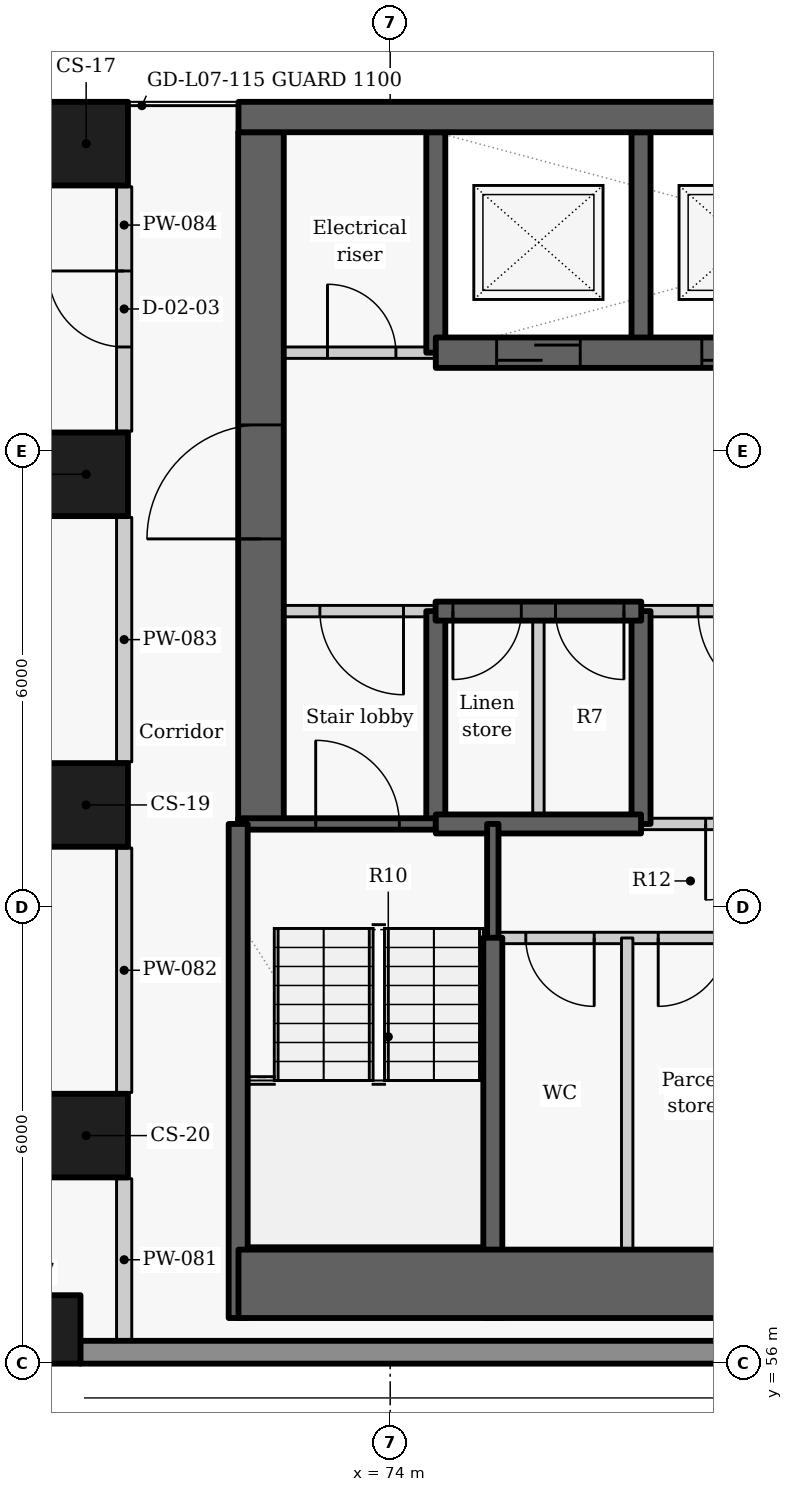
"""IFC4 building model, lengths in metres.
Left out: names, types, materials, properties, quantities, classifications, styles, units other than length and angle.
Written with IfcOpenShell. Run it as: python <this file> out.ifc"""

import sys

from ifc_helpers import new_model, si_unit, direction, frame, frame_2d, origin, origin_2d, place, context, subcontext, project, spatial, rectangle, extrude, element, fill, save


model = new_model("IFC4")
c1 = context("Model", 3, precision=1e-05, world=origin(), true_north=direction((0.0, 1.0)))
c2 = subcontext(c1, "Body", "Model", "MODEL_VIEW")
j1 = project(units=[si_unit("LENGTHUNIT", "METRE"), si_unit("PLANEANGLEUNIT", "RADIAN")], contexts=[c1])
p1 = place(None, origin())
s1 = spatial("IfcSite", under=j1, at=p1, CompositionType="ELEMENT")
p2 = place(p1, origin())
s2 = spatial("IfcBuilding", under=s1, at=p2, CompositionType="ELEMENT")
p3 = place(p2, frame((0.0, 0.0, 31.5)))
s3 = spatial("IfcBuildingStorey", under=s2, at=p3, CompositionType="ELEMENT", Elevation=31.5)
p4 = place(p3, frame((69.175, 56.45, 0.0), z_axis=(0.0, 0.0, 1.0), x_axis=(1.0, 0.0, 0.0)))
e1 = element("IfcColumn", 1, at=p4, inside=s3, PredefinedType="COLUMN", context=c2, shape_type="SweptSolid", body=[
    extrude(rectangle(XDim=1.5, YDim=0.9, at=origin_2d()), origin(), (0.0, 0.0, 1.0), 3.3),
])
for number, where, z_axis, x_axis in (
    (2, (70.0, 72.05, 0.0), (0.0, 0.0, 1.0), (0.0, -1.0, 0.0)),
    (3, (70.0, 67.7, 0.0), (0.0, 0.0, 1.0), (0.0, -1.0, 0.0)),
    (4, (70.0, 63.35, 0.0), (0.0, 0.0, 1.0), (0.0, -1.0, 0.0)),
    (5, (70.0, 59.0, 0.0), (0.0, 0.0, 1.0), (0.0, -1.0, 0.0)),
):
    element("IfcColumn", number, at=place(p3, frame(where, z_axis=z_axis, x_axis=x_axis)), inside=s3, PredefinedType="COLUMN", context=c2, shape_type="SweptSolid", body=[
        extrude(rectangle(XDim=1.1, YDim=1.1, at=origin_2d()), origin(), (0.0, 0.0, 1.0), 3.3),
    ])
p5 = place(p3, frame((69.921, 56.15, 0.0), z_axis=(0.0, 0.0, 1.0), x_axis=(1.0, 0.0, 0.0)))
e6 = element("IfcWall", 6, at=p5, inside=s3, PredefinedType="SOLIDWALL", context=c2, shape_type="SweptSolid", body=[
    extrude(rectangle(XDim=19.84, YDim=0.3, at=frame_2d((9.92, 0.0))), origin(), (0.0, 0.0, 1.0), 2.425),
])
p6 = place(p3, frame((74.6, 63.1, -0.275), z_axis=(0.0, 0.0, 1.0), x_axis=(0.0, 1.0, 0.0)))
e7 = element("IfcWall", 7, at=p6, inside=s3, PredefinedType="SHEAR", context=c2, shape_type="SweptSolid", body=[
    extrude(rectangle(XDim=2.8, YDim=0.25, at=frame_2d((1.4, 0.0))), origin(), (0.0, 0.0, 1.0), 3.3),
])
p7 = place(p3, frame((74.6, 69.3, -0.275), z_axis=(0.0, 0.0, 1.0), x_axis=(0.0, 1.0, 0.0)))
e8 = element("IfcWall", 8, at=p7, inside=s3, PredefinedType="SHEAR", context=c2, shape_type="SweptSolid", body=[
    extrude(rectangle(XDim=2.9, YDim=0.25, at=frame_2d((1.45, 0.0))), origin(), (0.0, 0.0, 1.0), 3.3),
])
p8 = place(p3, frame((72.0, 69.3, 0.0), z_axis=(0.0, 0.0, 1.0), x_axis=(1.0, 0.0, 0.0)))
e9 = element("IfcWall", 9, at=p8, inside=s3, PredefinedType="PARTITIONING", context=c2, shape_type="SweptSolid", body=[
    extrude(rectangle(XDim=2.6, YDim=0.15, at=frame_2d((1.3, 0.0))), origin(), (0.0, 0.0, 1.0), 3.025),
])
p9 = place(p8, frame((1.175, 0.0, 0.0)))
e10 = element("IfcOpeningElement", 10, at=p9, cuts=e9, PredefinedType="OPENING", context=c2, shape_type="SweptSolid", body=[
    extrude(rectangle(XDim=0.9, YDim=2.1, at=frame_2d((0.45, 1.05))), frame((0.0, 0.085, 0.0), z_axis=(0.0, -1.0, 0.0), x_axis=(1.0, 0.0, 0.0)), (0.0, 0.0, 1.0), 0.17),
])
p10 = place(p3, frame((72.3, 63.1, -0.275), z_axis=(0.0, 0.0, 1.0), x_axis=(0.0, 1.0, 0.0)))
e11 = element("IfcWall", 11, at=p10, inside=s3, PredefinedType="SHEAR", context=c2, shape_type="SweptSolid", body=[
    extrude(rectangle(XDim=9.1, YDim=0.6, at=frame_2d((4.55, 0.0))), origin(), (0.0, 0.0, 1.0), 3.3),
])
p11 = place(p10, frame((3.75, 0.0, 0.275)))
e12 = element("IfcOpeningElement", 12, at=p11, cuts=e11, PredefinedType="OPENING", context=c2, shape_type="SweptSolid", body=[
    extrude(rectangle(XDim=1.5, YDim=2.1, at=frame_2d((0.75, 1.05))), frame((0.0, 0.31, 0.0), z_axis=(0.0, -1.0, 0.0), x_axis=(1.0, 0.0, 0.0)), (0.0, 0.0, 1.0), 0.62),
])
p12 = place(p3, frame((77.3, 63.1, -0.275), z_axis=(0.0, 0.0, 1.0), x_axis=(0.0, 1.0, 0.0)))
e13 = element("IfcWall", 13, at=p12, inside=s3, PredefinedType="SHEAR", context=c2, shape_type="SweptSolid", body=[
    extrude(rectangle(XDim=2.8, YDim=0.25, at=frame_2d((1.4, 0.0))), origin(), (0.0, 0.0, 1.0), 3.3),
])
p13 = place(p3, frame((77.3, 69.3, -0.275), z_axis=(0.0, 0.0, 1.0), x_axis=(0.0, 1.0, 0.0)))
e14 = element("IfcWall", 14, at=p13, inside=s3, PredefinedType="SHEAR", context=c2, shape_type="SweptSolid", body=[
    extrude(rectangle(XDim=2.9, YDim=0.25, at=frame_2d((1.45, 0.0))), origin(), (0.0, 0.0, 1.0), 3.3),
])
p14 = place(p3, frame((74.6, 69.3, -0.275), z_axis=(0.0, 0.0, 1.0), x_axis=(1.0, 0.0, 0.0)))
e15 = element("IfcWall", 15, at=p14, inside=s3, PredefinedType="SHEAR", context=c2, shape_type="SweptSolid", body=[
    extrude(rectangle(XDim=10.8, YDim=0.4, at=frame_2d((5.4, 0.0))), origin(), (0.0, 0.0, 1.0), 3.3),
])
p15 = place(p14, frame((0.8, 0.0, 0.275)))
e16 = element("IfcOpeningElement", 16, at=p15, cuts=e15, PredefinedType="OPENING", context=c2, shape_type="SweptSolid", body=[
    extrude(rectangle(XDim=1.1, YDim=2.1, at=frame_2d((0.55, 1.05))), frame((0.0, 0.21, 0.0), z_axis=(0.0, -1.0, 0.0), x_axis=(1.0, 0.0, 0.0)), (0.0, 0.0, 1.0), 0.42),
])
p16 = place(p14, frame((3.5, 0.0, 0.275)))
e17 = element("IfcOpeningElement", 17, at=p16, cuts=e15, PredefinedType="OPENING", context=c2, shape_type="SweptSolid", body=[
    extrude(rectangle(XDim=1.1, YDim=2.1, at=frame_2d((0.55, 1.05))), frame((0.0, 0.21, 0.0), z_axis=(0.0, -1.0, 0.0), x_axis=(1.0, 0.0, 0.0)), (0.0, 0.0, 1.0), 0.42),
])
p17 = place(p14, frame((6.2, 0.0, 0.275)))
e18 = element("IfcOpeningElement", 18, at=p17, cuts=e15, PredefinedType="OPENING", context=c2, shape_type="SweptSolid", body=[
    extrude(rectangle(XDim=1.1, YDim=2.1, at=frame_2d((0.55, 1.05))), frame((0.0, 0.21, 0.0), z_axis=(0.0, -1.0, 0.0), x_axis=(1.0, 0.0, 0.0)), (0.0, 0.0, 1.0), 0.42),
])
p18 = place(p3, frame((74.603, 65.9, 0.0), z_axis=(0.0, 0.0, 1.0), x_axis=(-1.0, 0.0, 0.0)))
e19 = element("IfcWall", 19, at=p18, inside=s3, PredefinedType="PARTITIONING", context=c2, shape_type="SweptSolid", body=[
    extrude(rectangle(XDim=2.603, YDim=0.15, at=frame_2d((1.302, 0.0))), origin(), (0.0, 0.0, 1.0), 3.025),
])
p19 = place(p18, frame((0.428, 0.0, 0.0)))
e20 = element("IfcOpeningElement", 20, at=p19, cuts=e19, PredefinedType="OPENING", context=c2, shape_type="SweptSolid", body=[
    extrude(rectangle(XDim=1.1, YDim=2.1, at=frame_2d((0.55, 1.05))), frame((0.0, 0.085, 0.0), z_axis=(0.0, -1.0, 0.0), x_axis=(1.0, 0.0, 0.0)), (0.0, 0.0, 1.0), 0.17),
])
p20 = place(p3, frame((80.003, 65.9, 0.0), z_axis=(0.0, 0.0, 1.0), x_axis=(-1.0, 0.0, 0.0)))
e21 = element("IfcWall", 21, at=p20, inside=s3, PredefinedType="PARTITIONING", context=c2, shape_type="SweptSolid", body=[
    extrude(rectangle(XDim=2.706, YDim=0.15, at=frame_2d((1.353, 0.0))), origin(), (0.0, 0.0, 1.0), 3.025),
])
p21 = place(p20, frame((0.753, 0.0, 0.0)))
e22 = element("IfcOpeningElement", 22, at=p21, cuts=e21, PredefinedType="OPENING", context=c2, shape_type="SweptSolid", body=[
    extrude(rectangle(XDim=1.2, YDim=2.1, at=frame_2d((0.6, 1.05))), frame((0.0, 0.085, 0.0), z_axis=(0.0, -1.0, 0.0), x_axis=(1.0, 0.0, 0.0)), (0.0, 0.0, 1.0), 0.17),
])
p22 = place(p3, frame((77.303, 65.9, -0.275), z_axis=(0.0, 0.0, 1.0), x_axis=(-1.0, 0.0, 0.0)))
e23 = element("IfcWall", 23, at=p22, inside=s3, PredefinedType="SHEAR", context=c2, shape_type="SweptSolid", body=[
    extrude(rectangle(XDim=2.706, YDim=0.25, at=frame_2d((1.353, 0.0))), origin(), (0.0, 0.0, 1.0), 3.3),
])
p23 = place(p22, frame((1.578, 0.0, 0.275)))
e24 = element("IfcOpeningElement", 24, at=p23, cuts=e23, PredefinedType="OPENING", context=c2, shape_type="SweptSolid", body=[
    extrude(rectangle(XDim=0.9, YDim=2.1, at=frame_2d((0.45, 1.05))), frame((0.0, 0.135, 0.0), z_axis=(0.0, -1.0, 0.0), x_axis=(1.0, 0.0, 0.0)), (0.0, 0.0, 1.0), 0.27),
])
p24 = place(p22, frame((0.228, 0.0, 0.275)))
e25 = element("IfcOpeningElement", 25, at=p24, cuts=e23, PredefinedType="OPENING", context=c2, shape_type="SweptSolid", body=[
    extrude(rectangle(XDim=0.9, YDim=2.1, at=frame_2d((0.45, 1.05))), frame((0.0, 0.135, 0.0), z_axis=(0.0, -1.0, 0.0), x_axis=(1.0, 0.0, 0.0)), (0.0, 0.0, 1.0), 0.27),
])
p25 = place(p3, frame((72.0, 63.1, -0.275), z_axis=(0.0, 0.0, 1.0), x_axis=(1.0, 0.0, 0.0)))
e26 = element("IfcWall", 26, at=p25, inside=s3, PredefinedType="SHEAR", context=c2, shape_type="SweptSolid", body=[
    extrude(rectangle(XDim=2.6, YDim=0.15, at=frame_2d((1.3, 0.0))), origin(), (0.0, 0.0, 1.0), 3.3),
])
p26 = place(p25, frame((1.02, 0.0, 0.275)))
e27 = element("IfcOpeningElement", 27, at=p26, cuts=e26, PredefinedType="OPENING", context=c2, shape_type="SweptSolid", body=[
    extrude(rectangle(XDim=1.1, YDim=2.1, at=frame_2d((0.55, 1.05))), frame((0.0, 0.085, 0.0), z_axis=(0.0, -1.0, 0.0), x_axis=(1.0, 0.0, 0.0)), (0.0, 0.0, 1.0), 0.17),
])
p27 = place(p3, frame((75.95, 63.1, 0.0), z_axis=(0.0, 0.0, 1.0), x_axis=(0.0, 1.0, 0.0)))
e28 = element("IfcWall", 28, at=p27, inside=s3, PredefinedType="PARTITIONING", context=c2, shape_type="SweptSolid", body=[
    extrude(rectangle(XDim=2.8, YDim=0.15, at=frame_2d((1.4, 0.0))), origin(), (0.0, 0.0, 1.0), 3.025),
])
p28 = place(p3, frame((74.6, 63.1, -0.275), z_axis=(0.0, 0.0, 1.0), x_axis=(1.0, 0.0, 0.0)))
e29 = element("IfcWall", 29, at=p28, inside=s3, PredefinedType="SHEAR", context=c2, shape_type="SweptSolid", body=[
    extrude(rectangle(XDim=2.7, YDim=0.25, at=frame_2d((1.35, 0.0))), origin(), (0.0, 0.0, 1.0), 3.3),
])
p29 = place(p3, frame((80.0, 63.1, 0.0), z_axis=(0.0, 0.0, 1.0), x_axis=(-1.0, 0.0, 0.0)))
e30 = element("IfcWall", 30, at=p29, inside=s3, PredefinedType="PARTITIONING", context=c2, shape_type="SweptSolid", body=[
    extrude(rectangle(XDim=2.7, YDim=0.15, at=frame_2d((1.35, 0.0))), origin(), (0.0, 0.0, 1.0), 3.025),
])
p30 = place(p29, frame((0.85, 0.0, 0.0)))
e31 = element("IfcOpeningElement", 31, at=p30, cuts=e30, PredefinedType="OPENING", context=c2, shape_type="SweptSolid", body=[
    extrude(rectangle(XDim=1.0, YDim=2.1, at=frame_2d((0.5, 1.05))), frame((0.0, 0.085, 0.0), z_axis=(0.0, -1.0, 0.0), x_axis=(1.0, 0.0, 0.0)), (0.0, 0.0, 1.0), 0.17),
])
p31 = place(p3, frame((75.35, 61.597, -0.275), z_axis=(0.0, 0.0, 1.0), x_axis=(0.0, 1.0, 0.0)))
e32 = element("IfcWall", 32, at=p31, inside=s3, PredefinedType="SHEAR", context=c2, shape_type="SweptSolid", body=[
    extrude(rectangle(XDim=1.503, YDim=0.15, at=frame_2d((0.751, 0.0))), origin(), (0.0, 0.0, 1.0), 3.3),
])
p32 = place(p3, frame((75.35, 56.6, -0.275), z_axis=(0.0, 0.0, 1.0), x_axis=(0.0, 1.0, 0.0)))
e33 = element("IfcWall", 33, at=p32, inside=s3, PredefinedType="SHEAR", context=c2, shape_type="SweptSolid", body=[
    extrude(rectangle(XDim=5.003, YDim=0.25, at=frame_2d((2.501, 0.0))), origin(), (0.0, 0.0, 1.0), 3.3),
])
p33 = place(p3, frame((72.0, 56.6, -0.275), z_axis=(0.0, 0.0, 1.0), x_axis=(0.0, 1.0, 0.0)))
e34 = element("IfcWall", 34, at=p33, inside=s3, PredefinedType="SHEAR", context=c2, shape_type="SweptSolid", body=[
    extrude(rectangle(XDim=6.5, YDim=0.25, at=frame_2d((3.25, 0.0))), origin(), (0.0, 0.0, 1.0), 3.3),
])
p34 = place(p3, frame((80.55, 61.6, 0.0), z_axis=(0.0, 0.0, 1.0), x_axis=(-1.0, 0.0, 0.0)))
e35 = element("IfcWall", 35, at=p34, inside=s3, PredefinedType="PARTITIONING", context=c2, shape_type="SweptSolid", body=[
    extrude(rectangle(XDim=5.2, YDim=0.15, at=frame_2d((2.6, 0.0))), origin(), (0.0, 0.0, 1.0), 3.025),
])
p35 = place(p34, frame((3.866, 0.0, 0.0)))
e36 = element("IfcOpeningElement", 36, at=p35, cuts=e35, PredefinedType="OPENING", context=c2, shape_type="SweptSolid", body=[
    extrude(rectangle(XDim=0.9, YDim=2.1, at=frame_2d((0.45, 1.05))), frame((0.0, 0.085, 0.0), z_axis=(0.0, -1.0, 0.0), x_axis=(1.0, 0.0, 0.0)), (0.0, 0.0, 1.0), 0.17),
])
p36 = place(p34, frame((2.124, 0.0, 0.0)))
e37 = element("IfcOpeningElement", 37, at=p36, cuts=e35, PredefinedType="OPENING", context=c2, shape_type="SweptSolid", body=[
    extrude(rectangle(XDim=0.9, YDim=2.1, at=frame_2d((0.45, 1.05))), frame((0.0, 0.085, 0.0), z_axis=(0.0, -1.0, 0.0), x_axis=(1.0, 0.0, 0.0)), (0.0, 0.0, 1.0), 0.17),
])
p37 = place(p34, frame((0.408, 0.0, 0.0)))
e38 = element("IfcOpeningElement", 38, at=p37, cuts=e35, PredefinedType="OPENING", context=c2, shape_type="SweptSolid", body=[
    extrude(rectangle(XDim=0.9, YDim=2.1, at=frame_2d((0.45, 1.05))), frame((0.0, 0.085, 0.0), z_axis=(0.0, -1.0, 0.0), x_axis=(1.0, 0.0, 0.0)), (0.0, 0.0, 1.0), 0.17),
])
p38 = place(p3, frame((77.118, 56.6, 0.0), z_axis=(0.0, 0.0, 1.0), x_axis=(0.0, 1.0, 0.0)))
e39 = element("IfcWall", 39, at=p38, inside=s3, PredefinedType="PARTITIONING", context=c2, shape_type="SweptSolid", body=[
    extrude(rectangle(XDim=5.0, YDim=0.15, at=frame_2d((2.5, 0.0))), origin(), (0.0, 0.0, 1.0), 3.025),
])
p39 = place(p3, frame((70.5, 56.3, 0.0), z_axis=(0.0, 0.0, 1.0), x_axis=(0.0, 1.0, 0.0)))
e40 = element("IfcWall", 40, at=p39, inside=s3, PredefinedType="PARTITIONING", context=c2, shape_type="SweptSolid", body=[
    extrude(rectangle(XDim=2.133, YDim=0.2, at=frame_2d((1.066, 0.0))), origin(), (0.0, 0.0, 1.0), 3.025),
])
for number, where, z_axis, x_axis in (
    (41, (70.5, 59.567, 0.0), (0.0, 0.0, 1.0), (0.0, 1.0, 0.0)),
    (42, (70.5, 63.917, 0.0), (0.0, 0.0, 1.0), (0.0, 1.0, 0.0)),
):
    element("IfcWall", number, at=place(p3, frame(where, z_axis=z_axis, x_axis=x_axis)), inside=s3, PredefinedType="PARTITIONING", context=c2, shape_type="SweptSolid", body=[
        extrude(rectangle(XDim=3.216, YDim=0.2, at=frame_2d((1.608, 0.0))), origin(), (0.0, 0.0, 1.0), 3.025),
    ])
p40 = place(p3, frame((70.5, 68.267, 0.0), z_axis=(0.0, 0.0, 1.0), x_axis=(0.0, 1.0, 0.0)))
e43 = element("IfcWall", 43, at=p40, inside=s3, PredefinedType="PARTITIONING", context=c2, shape_type="SweptSolid", body=[
    extrude(rectangle(XDim=3.216, YDim=0.2, at=frame_2d((1.608, 0.0))), origin(), (0.0, 0.0, 1.0), 3.025),
])
p41 = place(p40, frame((1.108, 0.0, 0.0)))
e44 = element("IfcOpeningElement", 44, at=p41, cuts=e43, PredefinedType="OPENING", context=c2, shape_type="SweptSolid", body=[
    extrude(rectangle(XDim=1.0, YDim=2.1, at=frame_2d((0.5, 1.05))), frame((0.0, 0.11, 0.0), z_axis=(0.0, -1.0, 0.0), x_axis=(1.0, 0.0, 0.0)), (0.0, 0.0, 1.0), 0.22),
])
p42 = place(p3, frame((72.004, 72.4, -0.275), z_axis=(0.0, 0.0, 1.0), x_axis=(1.0, 0.0, 0.0)))
e45 = element("IfcWall", 45, at=p42, inside=s3, PredefinedType="SHEAR", context=c2, shape_type="SweptSolid", body=[
    extrude(rectangle(XDim=15.992, YDim=0.4, at=frame_2d((7.996, 0.0))), origin(), (0.0, 0.0, 1.0), 3.3),
])
p43 = place(p3, frame((72.004, 57.05, -0.275), z_axis=(0.0, 0.0, 1.0), x_axis=(1.0, 0.0, 0.0)))
e46 = element("IfcWall", 46, at=p43, inside=s3, PredefinedType="SHEAR", context=c2, shape_type="SweptSolid", body=[
    extrude(rectangle(XDim=15.992, YDim=0.9, at=frame_2d((7.996, 0.0))), origin(), (0.0, 0.0, 1.0), 3.3),
])
p44 = place(p9, origin())
e47 = element("IfcDoor", 47, at=p44, inside=s3, OperationType="SINGLE_SWING_LEFT", PredefinedType="DOOR", context=c2, shape_type="SweptSolid", body=[
    extrude(rectangle(XDim=0.9, YDim=2.1, at=frame_2d((0.45, 1.05))), frame((0.0, 0.025, 0.0), z_axis=(0.0, -1.0, 0.0), x_axis=(1.0, 0.0, 0.0)), (0.0, 0.0, 1.0), 0.05),
])
fill(e10, e47)
p45 = place(p15, origin())
e48 = element("IfcDoor", 48, at=p45, inside=s3, OperationType="SLIDING_TO_LEFT", PredefinedType="DOOR", context=c2, shape_type="SweptSolid", body=[
    extrude(rectangle(XDim=1.1, YDim=2.1, at=frame_2d((0.55, 1.05))), frame((0.0, 0.025, 0.0), z_axis=(0.0, -1.0, 0.0), x_axis=(1.0, 0.0, 0.0)), (0.0, 0.0, 1.0), 0.05),
])
fill(e16, e48)
p46 = place(p16, origin())
e49 = element("IfcDoor", 49, at=p46, inside=s3, OperationType="SLIDING_TO_LEFT", PredefinedType="DOOR", context=c2, shape_type="SweptSolid", body=[
    extrude(rectangle(XDim=1.1, YDim=2.1, at=frame_2d((0.55, 1.05))), frame((0.0, 0.025, 0.0), z_axis=(0.0, -1.0, 0.0), x_axis=(1.0, 0.0, 0.0)), (0.0, 0.0, 1.0), 0.05),
])
fill(e17, e49)
p47 = place(p19, origin())
e50 = element("IfcDoor", 50, at=p47, inside=s3, OperationType="SINGLE_SWING_LEFT", PredefinedType="DOOR", context=c2, shape_type="SweptSolid", body=[
    extrude(rectangle(XDim=1.1, YDim=2.1, at=frame_2d((0.55, 1.05))), frame((0.0, 0.025, 0.0), z_axis=(0.0, -1.0, 0.0), x_axis=(1.0, 0.0, 0.0)), (0.0, 0.0, 1.0), 0.05),
])
fill(e20, e50)
p48 = place(p23, origin())
e51 = element("IfcDoor", 51, at=p48, inside=s3, OperationType="SINGLE_SWING_RIGHT", PredefinedType="DOOR", context=c2, shape_type="SweptSolid", body=[
    extrude(rectangle(XDim=0.9, YDim=2.1, at=frame_2d((0.45, 1.05))), frame((0.0, 0.025, 0.0), z_axis=(0.0, -1.0, 0.0), x_axis=(1.0, 0.0, 0.0)), (0.0, 0.0, 1.0), 0.05),
])
fill(e24, e51)
p49 = place(p24, origin())
e52 = element("IfcDoor", 52, at=p49, inside=s3, OperationType="SINGLE_SWING_LEFT", PredefinedType="DOOR", context=c2, shape_type="SweptSolid", body=[
    extrude(rectangle(XDim=0.9, YDim=2.1, at=frame_2d((0.45, 1.05))), frame((0.0, 0.025, 0.0), z_axis=(0.0, -1.0, 0.0), x_axis=(1.0, 0.0, 0.0)), (0.0, 0.0, 1.0), 0.05),
])
fill(e25, e52)
p50 = place(p21, origin())
e53 = element("IfcDoor", 53, at=p50, inside=s3, OperationType="DOUBLE_DOOR_SINGLE_SWING", PredefinedType="DOOR", context=c2, shape_type="SweptSolid", body=[
    extrude(rectangle(XDim=1.2, YDim=2.1, at=frame_2d((0.6, 1.05))), frame((0.0, 0.025, 0.0), z_axis=(0.0, -1.0, 0.0), x_axis=(1.0, 0.0, 0.0)), (0.0, 0.0, 1.0), 0.05),
])
fill(e22, e53)
p51 = place(p30, origin())
e54 = element("IfcDoor", 54, at=p51, inside=s3, OperationType="SINGLE_SWING_RIGHT", PredefinedType="DOOR", context=c2, shape_type="SweptSolid", body=[
    extrude(rectangle(XDim=1.0, YDim=2.1, at=frame_2d((0.5, 1.05))), frame((0.0, 0.025, 0.0), z_axis=(0.0, -1.0, 0.0), x_axis=(1.0, 0.0, 0.0)), (0.0, 0.0, 1.0), 0.05),
])
fill(e31, e54)
p52 = place(p35, origin())
e55 = element("IfcDoor", 55, at=p52, inside=s3, OperationType="SINGLE_SWING_LEFT", PredefinedType="DOOR", context=c2, shape_type="SweptSolid", body=[
    extrude(rectangle(XDim=0.9, YDim=2.1, at=frame_2d((0.45, 1.05))), frame((0.0, 0.025, 0.0), z_axis=(0.0, -1.0, 0.0), x_axis=(1.0, 0.0, 0.0)), (0.0, 0.0, 1.0), 0.05),
])
fill(e36, e55)
p53 = place(p36, origin())
e56 = element("IfcDoor", 56, at=p53, inside=s3, OperationType="SINGLE_SWING_RIGHT", PredefinedType="DOOR", context=c2, shape_type="SweptSolid", body=[
    extrude(rectangle(XDim=0.9, YDim=2.1, at=frame_2d((0.45, 1.05))), frame((0.0, 0.025, 0.0), z_axis=(0.0, -1.0, 0.0), x_axis=(1.0, 0.0, 0.0)), (0.0, 0.0, 1.0), 0.05),
])
fill(e37, e56)
p54 = place(p26, origin())
e57 = element("IfcDoor", 57, at=p54, inside=s3, OperationType="SINGLE_SWING_LEFT", PredefinedType="DOOR", context=c2, shape_type="SweptSolid", body=[
    extrude(rectangle(XDim=1.1, YDim=2.1, at=frame_2d((0.55, 1.05))), frame((0.0, 0.025, 0.0), z_axis=(0.0, -1.0, 0.0), x_axis=(1.0, 0.0, 0.0)), (0.0, 0.0, 1.0), 0.05),
])
fill(e27, e57)
p55 = place(p41, origin())
e58 = element("IfcDoor", 58, at=p55, inside=s3, OperationType="SINGLE_SWING_RIGHT", PredefinedType="DOOR", context=c2, shape_type="SweptSolid", body=[
    extrude(rectangle(XDim=1.0, YDim=2.1, at=frame_2d((0.5, 1.05))), frame((0.0, 0.025, 0.0), z_axis=(0.0, -1.0, 0.0), x_axis=(1.0, 0.0, 0.0)), (0.0, 0.0, 1.0), 0.05),
])
fill(e44, e58)
p56 = place(p11, origin())
e59 = element("IfcDoor", 59, at=p56, inside=s3, OperationType="DOUBLE_DOOR_SINGLE_SWING", PredefinedType="DOOR", context=c2, shape_type="SweptSolid", body=[
    extrude(rectangle(XDim=1.5, YDim=2.1, at=frame_2d((0.75, 1.05))), frame((0.0, 0.025, 0.0), z_axis=(0.0, -1.0, 0.0), x_axis=(1.0, 0.0, 0.0)), (0.0, 0.0, 1.0), 0.05),
])
fill(e12, e59)
save(model, sys.argv[1])
